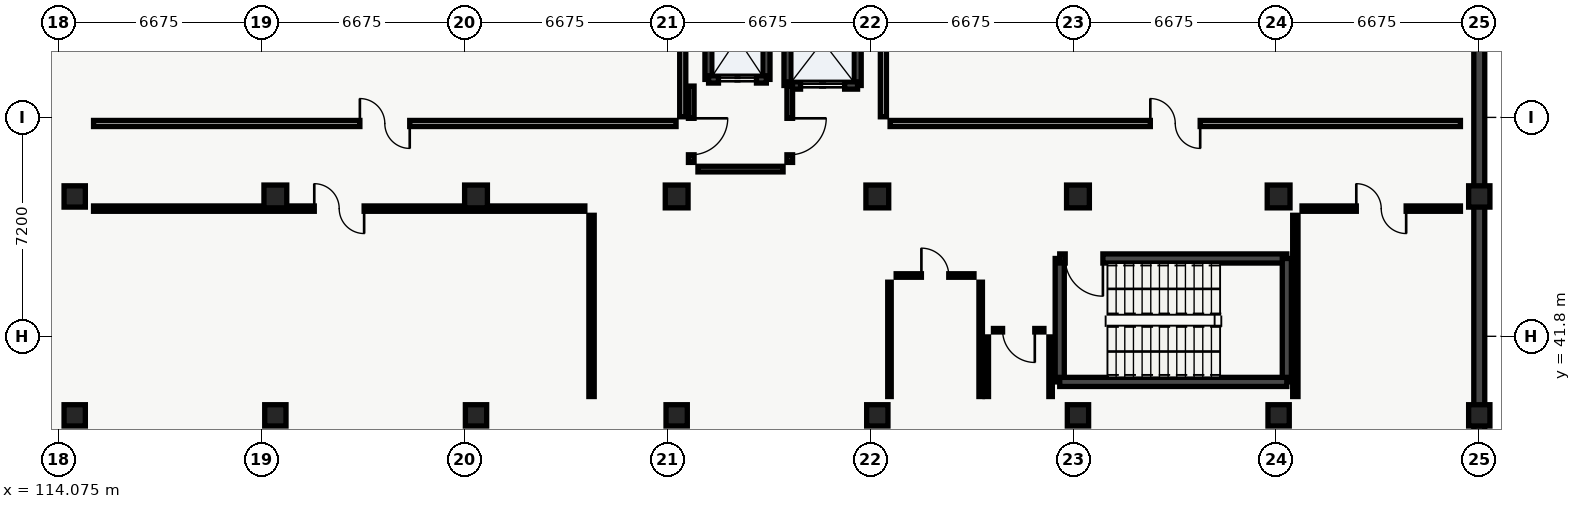
"""IFC4 building model, lengths in metres.
Left out: names, types, materials, properties, quantities, classifications, styles, units other than length and angle.
Written with IfcOpenShell. Run it as: python <this file> out.ifc"""

import sys

from ifc_helpers import new_model, si_unit, direction, frame, frame_2d, origin, origin_2d, place, context, subcontext, project, spatial, rectangle, extrude, element, fill, save


model = new_model("IFC4")
c1 = context("Model", 3, precision=1e-05, world=origin(), true_north=direction((0.0, 1.0)))
c2 = subcontext(c1, "Body", "Model", "MODEL_VIEW")
j1 = project(units=[si_unit("LENGTHUNIT", "METRE"), si_unit("PLANEANGLEUNIT", "RADIAN")], contexts=[c1])
p1 = place(None, origin())
s1 = spatial("IfcSite", under=j1, at=p1, CompositionType="ELEMENT")
p2 = place(p1, origin())
s2 = spatial("IfcBuilding", under=s1, at=p2, CompositionType="ELEMENT")
p3 = place(p2, frame((0.0, 0.0, -4.8)))
s3 = spatial("IfcBuildingStorey", under=s2, at=p3, CompositionType="ELEMENT", Elevation=-4.8)
for number, where, z_axis, x_axis in (
    (1, (114.6, 39.2, 0.0), (0.0, 0.0, 1.0), (1.0, 0.0, 0.0)),
    (2, (114.6, 46.4, 0.0), (0.0, 0.0, 1.0), (1.0, 0.0, 0.0)),
    (3, (121.2, 39.2, 0.0), (0.0, 0.0, 1.0), (1.0, 0.0, 0.0)),
):
    element("IfcColumn", number, at=place(p3, frame(where, z_axis=z_axis, x_axis=x_axis)), inside=s3, PredefinedType="COLUMN", context=c2, shape_type="SweptSolid", body=[
        extrude(rectangle(XDim=0.7, YDim=0.7, at=origin_2d()), origin(), (0.0, 0.0, 1.0), 4.59),
    ])
p4 = place(p3, frame((121.2, 46.4, 0.0), z_axis=(0.0, 0.0, 1.0), x_axis=(1.0, 0.0, 0.0)))
e4 = element("IfcColumn", 4, at=p4, inside=s3, PredefinedType="COLUMN", context=c2, shape_type="SweptSolid", body=[
    extrude(rectangle(XDim=0.75, YDim=0.75, at=origin_2d()), origin(), (0.0, 0.0, 1.0), 4.59),
])
p5 = place(p3, frame((127.8, 39.2, 0.0), z_axis=(0.0, 0.0, 1.0), x_axis=(1.0, 0.0, 0.0)))
e5 = element("IfcColumn", 5, at=p5, inside=s3, PredefinedType="COLUMN", context=c2, shape_type="SweptSolid", body=[
    extrude(rectangle(XDim=0.7, YDim=0.7, at=origin_2d()), origin(), (0.0, 0.0, 1.0), 4.59),
])
p6 = place(p3, frame((127.8, 46.4, 0.0), z_axis=(0.0, 0.0, 1.0), x_axis=(1.0, 0.0, 0.0)))
e6 = element("IfcColumn", 6, at=p6, inside=s3, PredefinedType="COLUMN", context=c2, shape_type="SweptSolid", body=[
    extrude(rectangle(XDim=0.75, YDim=0.75, at=origin_2d()), origin(), (0.0, 0.0, 1.0), 4.59),
])
p7 = place(p3, frame((134.4, 39.2, 0.0), z_axis=(0.0, 0.0, 1.0), x_axis=(1.0, 0.0, 0.0)))
e7 = element("IfcColumn", 7, at=p7, inside=s3, PredefinedType="COLUMN", context=c2, shape_type="SweptSolid", body=[
    extrude(rectangle(XDim=0.7, YDim=0.7, at=origin_2d()), origin(), (0.0, 0.0, 1.0), 4.59),
])
p8 = place(p3, frame((134.4, 46.4, 0.0), z_axis=(0.0, 0.0, 1.0), x_axis=(1.0, 0.0, 0.0)))
e8 = element("IfcColumn", 8, at=p8, inside=s3, PredefinedType="COLUMN", context=c2, shape_type="SweptSolid", body=[
    extrude(rectangle(XDim=0.75, YDim=0.75, at=origin_2d()), origin(), (0.0, 0.0, 1.0), 4.59),
])
p9 = place(p3, frame((141.0, 39.2, 0.0), z_axis=(0.0, 0.0, 1.0), x_axis=(1.0, 0.0, 0.0)))
e9 = element("IfcColumn", 9, at=p9, inside=s3, PredefinedType="COLUMN", context=c2, shape_type="SweptSolid", body=[
    extrude(rectangle(XDim=0.7, YDim=0.7, at=origin_2d()), origin(), (0.0, 0.0, 1.0), 4.59),
])
p10 = place(p3, frame((141.0, 46.4, 0.0), z_axis=(0.0, 0.0, 1.0), x_axis=(1.0, 0.0, 0.0)))
e10 = element("IfcColumn", 10, at=p10, inside=s3, PredefinedType="COLUMN", context=c2, shape_type="SweptSolid", body=[
    extrude(rectangle(XDim=0.75, YDim=0.75, at=origin_2d()), origin(), (0.0, 0.0, 1.0), 4.59),
])
p11 = place(p3, frame((147.6, 39.2, 0.0), z_axis=(0.0, 0.0, 1.0), x_axis=(1.0, 0.0, 0.0)))
e11 = element("IfcColumn", 11, at=p11, inside=s3, PredefinedType="COLUMN", context=c2, shape_type="SweptSolid", body=[
    extrude(rectangle(XDim=0.7, YDim=0.7, at=origin_2d()), origin(), (0.0, 0.0, 1.0), 4.59),
])
p12 = place(p3, frame((147.6, 46.4, 0.0), z_axis=(0.0, 0.0, 1.0), x_axis=(1.0, 0.0, 0.0)))
e12 = element("IfcColumn", 12, at=p12, inside=s3, PredefinedType="COLUMN", context=c2, shape_type="SweptSolid", body=[
    extrude(rectangle(XDim=0.75, YDim=0.75, at=origin_2d()), origin(), (0.0, 0.0, 1.0), 4.59),
])
p13 = place(p3, frame((154.2, 39.2, 0.0), z_axis=(0.0, 0.0, 1.0), x_axis=(1.0, 0.0, 0.0)))
e13 = element("IfcColumn", 13, at=p13, inside=s3, PredefinedType="COLUMN", context=c2, shape_type="SweptSolid", body=[
    extrude(rectangle(XDim=0.7, YDim=0.7, at=origin_2d()), origin(), (0.0, 0.0, 1.0), 4.59),
])
p14 = place(p3, frame((154.2, 46.4, 0.0), z_axis=(0.0, 0.0, 1.0), x_axis=(1.0, 0.0, 0.0)))
e14 = element("IfcColumn", 14, at=p14, inside=s3, PredefinedType="COLUMN", context=c2, shape_type="SweptSolid", body=[
    extrude(rectangle(XDim=0.75, YDim=0.75, at=origin_2d()), origin(), (0.0, 0.0, 1.0), 4.59),
])
for number, where, z_axis, x_axis in (
    (15, (160.8, 39.2, 0.0), (0.0, 0.0, 1.0), (1.0, 0.0, 0.0)),
    (16, (160.8, 46.4, 0.0), (0.0, 0.0, 1.0), (1.0, 0.0, 0.0)),
):
    element("IfcColumn", number, at=place(p3, frame(where, z_axis=z_axis, x_axis=x_axis)), inside=s3, PredefinedType="COLUMN", context=c2, shape_type="SweptSolid", body=[
        extrude(rectangle(XDim=0.7, YDim=0.7, at=origin_2d()), origin(), (0.0, 0.0, 1.0), 4.59),
    ])
p15 = place(p3, frame((160.8, 61.6, 0.0), z_axis=(0.0, 0.0, 1.0), x_axis=(0.0, -1.0, 0.0)))
e17 = element("IfcWall", 17, at=p15, inside=s3, PredefinedType="USERDEFINED", context=c2, shape_type="SweptSolid", body=[
    extrude(rectangle(XDim=61.4, YDim=0.36, at=frame_2d((30.7, 0.0))), origin(), (0.0, 0.0, 1.0), 4.58),
])
p16 = place(p3, frame((147.0, 40.3, 0.0), z_axis=(0.0, 0.0, 1.0), x_axis=(0.0, 1.0, 0.0)))
e18 = element("IfcWall", 18, at=p16, inside=s3, PredefinedType="SHEAR", context=c2, shape_type="SweptSolid", body=[
    extrude(rectangle(XDim=4.06, YDim=0.3, at=frame_2d((2.03, 0.0))), origin(), (0.0, 0.0, 1.0), 4.58),
])
p17 = place(p3, frame((147.0, 44.36, 0.0), z_axis=(0.0, 0.0, 1.0), x_axis=(1.0, 0.0, 0.0)))
e19 = element("IfcWall", 19, at=p17, inside=s3, PredefinedType="SHEAR", context=c2, shape_type="SweptSolid", body=[
    extrude(rectangle(XDim=7.47, YDim=0.3, at=frame_2d((3.735, 0.0))), origin(), (0.0, 0.0, 1.0), 4.58),
])
p18 = place(p17, frame((0.18, 0.0, 0.0)))
e20 = element("IfcOpeningElement", 20, at=p18, cuts=e19, PredefinedType="OPENING", context=c2, shape_type="SweptSolid", body=[
    extrude(rectangle(XDim=1.24, YDim=2.15, at=frame_2d((0.62, 1.075))), frame((0.0, 0.15, 0.0), z_axis=(0.0, -1.0, 0.0), x_axis=(1.0, 0.0, 0.0)), (0.0, 0.0, 1.0), 0.3),
])
p19 = place(p3, frame((154.47, 44.36, 0.0), z_axis=(0.0, 0.0, 1.0), x_axis=(0.0, -1.0, 0.0)))
e21 = element("IfcWall", 21, at=p19, inside=s3, PredefinedType="SHEAR", context=c2, shape_type="SweptSolid", body=[
    extrude(rectangle(XDim=4.06, YDim=0.3, at=frame_2d((2.03, 0.0))), origin(), (0.0, 0.0, 1.0), 4.58),
])
p20 = place(p3, frame((154.47, 40.3, 0.0), z_axis=(0.0, 0.0, 1.0), x_axis=(-1.0, 0.0, 0.0)))
e22 = element("IfcWall", 22, at=p20, inside=s3, PredefinedType="SHEAR", context=c2, shape_type="SweptSolid", body=[
    extrude(rectangle(XDim=7.47, YDim=0.3, at=frame_2d((3.735, 0.0))), origin(), (0.0, 0.0, 1.0), 4.58),
])
for number, where, z_axis, x_axis in (
    (23, (135.45, 50.25, 0.0), (0.0, 0.0, 1.0), (0.0, 1.0, 0.0)),
    (24, (137.35, 52.95, 0.0), (0.0, 0.0, 1.0), (0.0, -1.0, 0.0)),
):
    element("IfcWall", number, at=place(p3, frame(where, z_axis=z_axis, x_axis=x_axis)), inside=s3, PredefinedType="SHEAR", context=c2, shape_type="SweptSolid", body=[
        extrude(rectangle(XDim=2.7, YDim=0.24, at=frame_2d((1.35, 0.0))), origin(), (0.0, 0.0, 1.0), 4.58),
    ])
p21 = place(p3, frame((137.35, 50.25, 0.0), z_axis=(0.0, 0.0, 1.0), x_axis=(-1.0, 0.0, 0.0)))
e25 = element("IfcWall", 25, at=p21, inside=s3, PredefinedType="SHEAR", context=c2, shape_type="SweptSolid", body=[
    extrude(rectangle(XDim=1.9, YDim=0.24, at=frame_2d((0.95, 0.0))), origin(), (0.0, 0.0, 1.0), 4.58),
])
p22 = place(p21, frame((0.325, 0.0, 0.0)))
e26 = element("IfcOpeningElement", 26, at=p22, cuts=e25, PredefinedType="OPENING", context=c2, shape_type="SweptSolid", body=[
    extrude(rectangle(XDim=1.25, YDim=2.2, at=frame_2d((0.625, 1.1))), frame((0.0, 0.12, 0.0), z_axis=(0.0, -1.0, 0.0), x_axis=(1.0, 0.0, 0.0)), (0.0, 0.0, 1.0), 0.24),
])
for number, where, z_axis, x_axis in (
    (27, (138.05, 50.05, 0.0), (0.0, 0.0, 1.0), (0.0, 1.0, 0.0)),
    (28, (140.35, 52.95, 0.0), (0.0, 0.0, 1.0), (0.0, -1.0, 0.0)),
):
    element("IfcWall", number, at=place(p3, frame(where, z_axis=z_axis, x_axis=x_axis)), inside=s3, PredefinedType="SHEAR", context=c2, shape_type="SweptSolid", body=[
        extrude(rectangle(XDim=2.9, YDim=0.24, at=frame_2d((1.45, 0.0))), origin(), (0.0, 0.0, 1.0), 4.58),
    ])
p23 = place(p3, frame((140.35, 50.05, 0.0), z_axis=(0.0, 0.0, 1.0), x_axis=(-1.0, 0.0, 0.0)))
e29 = element("IfcWall", 29, at=p23, inside=s3, PredefinedType="SHEAR", context=c2, shape_type="SweptSolid", body=[
    extrude(rectangle(XDim=2.3, YDim=0.24, at=frame_2d((1.15, 0.0))), origin(), (0.0, 0.0, 1.0), 4.58),
])
p24 = place(p23, frame((0.425, 0.0, 0.0)))
e30 = element("IfcOpeningElement", 30, at=p24, cuts=e29, PredefinedType="OPENING", context=c2, shape_type="SweptSolid", body=[
    extrude(rectangle(XDim=1.45, YDim=2.3, at=frame_2d((0.725, 1.15))), frame((0.0, 0.12, 0.0), z_axis=(0.0, -1.0, 0.0), x_axis=(1.0, 0.0, 0.0)), (0.0, 0.0, 1.0), 0.24),
])
p25 = place(p3, frame((135.1, 47.3, 0.0), z_axis=(0.0, 0.0, 1.0), x_axis=(1.0, 0.0, 0.0)))
e31 = element("IfcWall", 31, at=p25, inside=s3, PredefinedType="SOLIDWALL", context=c2, shape_type="SweptSolid", body=[
    extrude(rectangle(XDim=2.8, YDim=0.185, at=frame_2d((1.4, 0.0))), origin(), (0.0, 0.0, 1.0), 4.25),
])
p26 = place(p3, frame((138.12, 47.52, 0.0), z_axis=(0.0, 0.0, 1.0), x_axis=(0.0, 1.0, 0.0)))
e32 = element("IfcWall", 32, at=p26, inside=s3, PredefinedType="SOLIDWALL", context=c2, shape_type="SweptSolid", body=[
    extrude(rectangle(XDim=2.51, YDim=0.185, at=frame_2d((1.255, 0.0))), origin(), (0.0, 0.0, 1.0), 4.25),
])
p27 = place(p26, frame((0.25, 0.0, 0.0)))
e33 = element("IfcOpeningElement", 33, at=p27, cuts=e32, PredefinedType="OPENING", context=c2, shape_type="SweptSolid", body=[
    extrude(rectangle(XDim=1.2, YDim=2.15, at=frame_2d((0.6, 1.075))), frame((0.0, 0.093, 0.0), z_axis=(0.0, -1.0, 0.0), x_axis=(1.0, 0.0, 0.0)), (0.0, 0.0, 1.0), 0.185),
])
p28 = place(p3, frame((134.88, 50.03, 0.0), z_axis=(0.0, 0.0, 1.0), x_axis=(0.0, -1.0, 0.0)))
e34 = element("IfcWall", 34, at=p28, inside=s3, PredefinedType="SOLIDWALL", context=c2, shape_type="SweptSolid", body=[
    extrude(rectangle(XDim=2.51, YDim=0.185, at=frame_2d((1.255, 0.0))), origin(), (0.0, 0.0, 1.0), 4.25),
])
p29 = place(p28, frame((1.06, 0.0, 0.0)))
e35 = element("IfcOpeningElement", 35, at=p29, cuts=e34, PredefinedType="OPENING", context=c2, shape_type="SweptSolid", body=[
    extrude(rectangle(XDim=1.2, YDim=2.15, at=frame_2d((0.6, 1.075))), frame((0.0, 0.093, 0.0), z_axis=(0.0, -1.0, 0.0), x_axis=(1.0, 0.0, 0.0)), (0.0, 0.0, 1.0), 0.185),
])
p30 = place(p3, frame((144.4, 39.82, 0.0), z_axis=(0.0, 0.0, 1.0), x_axis=(0.0, 1.0, 0.0)))
e36 = element("IfcWall", 36, at=p30, inside=s3, PredefinedType="PARTITIONING", context=c2, shape_type="SweptSolid", body=[
    extrude(rectangle(XDim=3.76, YDim=0.115, at=frame_2d((1.88, 0.0))), origin(), (0.0, 0.0, 1.0), 4.25),
])
p31 = place(p3, frame((144.18, 43.8, 0.0), z_axis=(0.0, 0.0, 1.0), x_axis=(-1.0, 0.0, 0.0)))
e37 = element("IfcWall", 37, at=p31, inside=s3, PredefinedType="PARTITIONING", context=c2, shape_type="SweptSolid", body=[
    extrude(rectangle(XDim=2.56, YDim=0.115, at=frame_2d((1.28, 0.0))), origin(), (0.0, 0.0, 1.0), 4.25),
])
p32 = place(p31, frame((0.83, 0.0, 0.0)))
e38 = element("IfcOpeningElement", 38, at=p32, cuts=e37, PredefinedType="OPENING", context=c2, shape_type="SweptSolid", body=[
    extrude(rectangle(XDim=0.9, YDim=2.1, at=frame_2d((0.45, 1.05))), frame((0.0, 0.058, 0.0), z_axis=(0.0, -1.0, 0.0), x_axis=(1.0, 0.0, 0.0)), (0.0, 0.0, 1.0), 0.115),
])
p33 = place(p3, frame((141.4, 43.58, 0.0), z_axis=(0.0, 0.0, 1.0), x_axis=(0.0, -1.0, 0.0)))
e39 = element("IfcWall", 39, at=p33, inside=s3, PredefinedType="PARTITIONING", context=c2, shape_type="SweptSolid", body=[
    extrude(rectangle(XDim=3.76, YDim=0.115, at=frame_2d((1.88, 0.0))), origin(), (0.0, 0.0, 1.0), 4.25),
])
p34 = place(p3, frame((146.7, 39.82, 0.0), z_axis=(0.0, 0.0, 1.0), x_axis=(0.0, 1.0, 0.0)))
e40 = element("IfcWall", 40, at=p34, inside=s3, PredefinedType="PARTITIONING", context=c2, shape_type="SweptSolid", body=[
    extrude(rectangle(XDim=1.96, YDim=0.115, at=frame_2d((0.98, 0.0))), origin(), (0.0, 0.0, 1.0), 4.25),
])
p35 = place(p3, frame((146.48, 42.0, 0.0), z_axis=(0.0, 0.0, 1.0), x_axis=(-1.0, 0.0, 0.0)))
e41 = element("IfcWall", 41, at=p35, inside=s3, PredefinedType="PARTITIONING", context=c2, shape_type="SweptSolid", body=[
    extrude(rectangle(XDim=1.66, YDim=0.115, at=frame_2d((0.83, 0.0))), origin(), (0.0, 0.0, 1.0), 4.25),
])
p36 = place(p35, frame((0.3, 0.0, 0.0)))
e42 = element("IfcOpeningElement", 42, at=p36, cuts=e41, PredefinedType="OPENING", context=c2, shape_type="SweptSolid", body=[
    extrude(rectangle(XDim=1.06, YDim=2.12, at=frame_2d((0.53, 1.06))), frame((0.0, 0.058, 0.0), z_axis=(0.0, -1.0, 0.0), x_axis=(1.0, 0.0, 0.0)), (0.0, 0.0, 1.0), 0.115),
])
p37 = place(p3, frame((144.6, 41.78, 0.0), z_axis=(0.0, 0.0, 1.0), x_axis=(0.0, -1.0, 0.0)))
e43 = element("IfcWall", 43, at=p37, inside=s3, PredefinedType="PARTITIONING", context=c2, shape_type="SweptSolid", body=[
    extrude(rectangle(XDim=1.96, YDim=0.115, at=frame_2d((0.98, 0.0))), origin(), (0.0, 0.0, 1.0), 4.25),
])
p38 = place(p3, frame((115.22, 48.8, 0.0), z_axis=(0.0, 0.0, 1.0), x_axis=(1.0, 0.0, 0.0)))
e44 = element("IfcWall", 44, at=p38, inside=s3, PredefinedType="SOLIDWALL", context=c2, shape_type="SweptSolid", body=[
    extrude(rectangle(XDim=19.16, YDim=0.2, at=frame_2d((9.58, 0.0))), origin(), (0.0, 0.0, 1.0), 4.125),
])
p39 = place(p38, frame((8.76, 0.0, 0.0)))
e45 = element("IfcOpeningElement", 45, at=p39, cuts=e44, PredefinedType="OPENING", context=c2, shape_type="SweptSolid", body=[
    extrude(rectangle(XDim=1.64, YDim=2.2, at=frame_2d((0.82, 1.1))), frame((0.0, 0.1, 0.0), z_axis=(0.0, -1.0, 0.0), x_axis=(1.0, 0.0, 0.0)), (0.0, 0.0, 1.0), 0.2),
])
p40 = place(p3, frame((134.6, 49.02, 0.0), z_axis=(0.0, 0.0, 1.0), x_axis=(0.0, 1.0, 0.0)))
e46 = element("IfcWall", 46, at=p40, inside=s3, PredefinedType="SOLIDWALL", context=c2, shape_type="SweptSolid", body=[
    extrude(rectangle(XDim=11.16, YDim=0.2, at=frame_2d((5.58, 0.0))), origin(), (0.0, 0.0, 1.0), 3.925),
])
p41 = place(p3, frame((141.42, 48.8, 0.0), z_axis=(0.0, 0.0, 1.0), x_axis=(1.0, 0.0, 0.0)))
e47 = element("IfcWall", 47, at=p41, inside=s3, PredefinedType="SOLIDWALL", context=c2, shape_type="SweptSolid", body=[
    extrude(rectangle(XDim=18.76, YDim=0.2, at=frame_2d((9.38, 0.0))), origin(), (0.0, 0.0, 1.0), 4.125),
])
p42 = place(p41, frame((8.56, 0.0, 0.0)))
e48 = element("IfcOpeningElement", 48, at=p42, cuts=e47, PredefinedType="OPENING", context=c2, shape_type="SweptSolid", body=[
    extrude(rectangle(XDim=1.64, YDim=2.2, at=frame_2d((0.82, 1.1))), frame((0.0, 0.1, 0.0), z_axis=(0.0, -1.0, 0.0), x_axis=(1.0, 0.0, 0.0)), (0.0, 0.0, 1.0), 0.2),
])
p43 = place(p3, frame((141.2, 60.18, 0.0), z_axis=(0.0, 0.0, 1.0), x_axis=(0.0, -1.0, 0.0)))
e49 = element("IfcWall", 49, at=p43, inside=s3, PredefinedType="SOLIDWALL", context=c2, shape_type="SweptSolid", body=[
    extrude(rectangle(XDim=11.16, YDim=0.2, at=frame_2d((5.58, 0.0))), origin(), (0.0, 0.0, 1.0), 3.925),
])
p44 = place(p3, frame((131.6, 39.82, 0.0), z_axis=(0.0, 0.0, 1.0), x_axis=(0.0, 1.0, 0.0)))
e50 = element("IfcWall", 50, at=p44, inside=s3, PredefinedType="SOLIDWALL", context=c2, shape_type="SweptSolid", body=[
    extrude(rectangle(XDim=5.96, YDim=0.175, at=frame_2d((2.98, 0.0))), origin(), (0.0, 0.0, 1.0), 4.25),
])
p45 = place(p3, frame((131.38, 46.0, 0.0), z_axis=(0.0, 0.0, 1.0), x_axis=(-1.0, 0.0, 0.0)))
e51 = element("IfcWall", 51, at=p45, inside=s3, PredefinedType="SOLIDWALL", context=c2, shape_type="SweptSolid", body=[
    extrude(rectangle(XDim=16.16, YDim=0.175, at=frame_2d((8.08, 0.0))), origin(), (0.0, 0.0, 1.0), 4.25),
])
p46 = place(p45, frame((7.26, 0.0, 0.0)))
e52 = element("IfcOpeningElement", 52, at=p46, cuts=e51, PredefinedType="OPENING", context=c2, shape_type="SweptSolid", body=[
    extrude(rectangle(XDim=1.64, YDim=2.2, at=frame_2d((0.82, 1.1))), frame((0.0, 0.087, 0.0), z_axis=(0.0, -1.0, 0.0), x_axis=(1.0, 0.0, 0.0)), (0.0, 0.0, 1.0), 0.175),
])
p47 = place(p3, frame((160.18, 46.0, 0.0), z_axis=(0.0, 0.0, 1.0), x_axis=(-1.0, 0.0, 0.0)))
e53 = element("IfcWall", 53, at=p47, inside=s3, PredefinedType="SOLIDWALL", context=c2, shape_type="SweptSolid", body=[
    extrude(rectangle(XDim=5.21, YDim=0.175, at=frame_2d((2.605, 0.0))), origin(), (0.0, 0.0, 1.0), 4.25),
])
p48 = place(p47, frame((1.785, 0.0, 0.0)))
e54 = element("IfcOpeningElement", 54, at=p48, cuts=e53, PredefinedType="OPENING", context=c2, shape_type="SweptSolid", body=[
    extrude(rectangle(XDim=1.64, YDim=2.2, at=frame_2d((0.82, 1.1))), frame((0.0, 0.087, 0.0), z_axis=(0.0, -1.0, 0.0), x_axis=(1.0, 0.0, 0.0)), (0.0, 0.0, 1.0), 0.175),
])
p49 = place(p3, frame((154.75, 45.78, 0.0), z_axis=(0.0, 0.0, 1.0), x_axis=(0.0, -1.0, 0.0)))
e55 = element("IfcWall", 55, at=p49, inside=s3, PredefinedType="SOLIDWALL", context=c2, shape_type="SweptSolid", body=[
    extrude(rectangle(XDim=5.96, YDim=0.175, at=frame_2d((2.98, 0.0))), origin(), (0.0, 0.0, 1.0), 4.25),
])
p50 = place(p18, origin())
e56 = element("IfcDoor", 56, at=p50, inside=s3, OperationType="SINGLE_SWING_RIGHT", PredefinedType="DOOR", context=c2, shape_type="SweptSolid", body=[
    extrude(rectangle(XDim=1.24, YDim=2.15, at=frame_2d((0.62, 1.075))), frame((0.0, 0.025, 0.0), z_axis=(0.0, -1.0, 0.0), x_axis=(1.0, 0.0, 0.0)), (0.0, 0.0, 1.0), 0.05),
])
fill(e20, e56)
p51 = place(p22, origin())
e57 = element("IfcDoor", 57, at=p51, inside=s3, OperationType="SLIDING_TO_RIGHT", PredefinedType="DOOR", context=c2, shape_type="SweptSolid", body=[
    extrude(rectangle(XDim=1.25, YDim=2.2, at=frame_2d((0.625, 1.1))), frame((0.0, 0.025, 0.0), z_axis=(0.0, -1.0, 0.0), x_axis=(1.0, 0.0, 0.0)), (0.0, 0.0, 1.0), 0.05),
])
fill(e26, e57)
p52 = place(p24, origin())
e58 = element("IfcDoor", 58, at=p52, inside=s3, OperationType="DOUBLE_DOOR_SLIDING", PredefinedType="DOOR", context=c2, shape_type="SweptSolid", body=[
    extrude(rectangle(XDim=1.45, YDim=2.3, at=frame_2d((0.725, 1.15))), frame((0.0, 0.025, 0.0), z_axis=(0.0, -1.0, 0.0), x_axis=(1.0, 0.0, 0.0)), (0.0, 0.0, 1.0), 0.05),
])
fill(e30, e58)
p53 = place(p27, origin())
e59 = element("IfcDoor", 59, at=p53, inside=s3, OperationType="SINGLE_SWING_RIGHT", PredefinedType="DOOR", context=c2, shape_type="SweptSolid", body=[
    extrude(rectangle(XDim=1.2, YDim=2.15, at=frame_2d((0.6, 1.075))), frame((0.0, 0.025, 0.0), z_axis=(0.0, -1.0, 0.0), x_axis=(1.0, 0.0, 0.0)), (0.0, 0.0, 1.0), 0.05),
])
fill(e33, e59)
p54 = place(p29, origin())
e60 = element("IfcDoor", 60, at=p54, inside=s3, OperationType="SINGLE_SWING_LEFT", PredefinedType="DOOR", context=c2, shape_type="SweptSolid", body=[
    extrude(rectangle(XDim=1.2, YDim=2.15, at=frame_2d((0.6, 1.075))), frame((0.0, 0.025, 0.0), z_axis=(0.0, -1.0, 0.0), x_axis=(1.0, 0.0, 0.0)), (0.0, 0.0, 1.0), 0.05),
])
fill(e35, e60)
p55 = place(p32, origin())
e61 = element("IfcDoor", 61, at=p55, inside=s3, OperationType="SINGLE_SWING_RIGHT", PredefinedType="DOOR", context=c2, shape_type="SweptSolid", body=[
    extrude(rectangle(XDim=0.9, YDim=2.1, at=frame_2d((0.45, 1.05))), frame((0.0, 0.025, 0.0), z_axis=(0.0, -1.0, 0.0), x_axis=(1.0, 0.0, 0.0)), (0.0, 0.0, 1.0), 0.05),
])
fill(e38, e61)
p56 = place(p36, origin())
e62 = element("IfcDoor", 62, at=p56, inside=s3, OperationType="SINGLE_SWING_LEFT", PredefinedType="DOOR", context=c2, shape_type="SweptSolid", body=[
    extrude(rectangle(XDim=1.06, YDim=2.12, at=frame_2d((0.53, 1.06))), frame((0.0, 0.025, 0.0), z_axis=(0.0, -1.0, 0.0), x_axis=(1.0, 0.0, 0.0)), (0.0, 0.0, 1.0), 0.05),
])
fill(e42, e62)
p57 = place(p39, origin())
e63 = element("IfcDoor", 63, at=p57, inside=s3, OperationType="DOUBLE_DOOR_SINGLE_SWING", PredefinedType="DOOR", context=c2, shape_type="SweptSolid", body=[
    extrude(rectangle(XDim=1.64, YDim=2.2, at=frame_2d((0.82, 1.1))), frame((0.0, 0.025, 0.0), z_axis=(0.0, -1.0, 0.0), x_axis=(1.0, 0.0, 0.0)), (0.0, 0.0, 1.0), 0.05),
])
fill(e45, e63)
p58 = place(p42, origin())
e64 = element("IfcDoor", 64, at=p58, inside=s3, OperationType="DOUBLE_DOOR_SINGLE_SWING", PredefinedType="DOOR", context=c2, shape_type="SweptSolid", body=[
    extrude(rectangle(XDim=1.64, YDim=2.2, at=frame_2d((0.82, 1.1))), frame((0.0, 0.025, 0.0), z_axis=(0.0, -1.0, 0.0), x_axis=(1.0, 0.0, 0.0)), (0.0, 0.0, 1.0), 0.05),
])
fill(e48, e64)
p59 = place(p46, origin())
e65 = element("IfcDoor", 65, at=p59, inside=s3, OperationType="DOUBLE_DOOR_SINGLE_SWING", PredefinedType="DOOR", context=c2, shape_type="SweptSolid", body=[
    extrude(rectangle(XDim=1.64, YDim=2.2, at=frame_2d((0.82, 1.1))), frame((0.0, 0.025, 0.0), z_axis=(0.0, -1.0, 0.0), x_axis=(1.0, 0.0, 0.0)), (0.0, 0.0, 1.0), 0.05),
])
fill(e52, e65)
p60 = place(p48, origin())
e66 = element("IfcDoor", 66, at=p60, inside=s3, OperationType="DOUBLE_DOOR_SINGLE_SWING", PredefinedType="DOOR", context=c2, shape_type="SweptSolid", body=[
    extrude(rectangle(XDim=1.64, YDim=2.2, at=frame_2d((0.82, 1.1))), frame((0.0, 0.025, 0.0), z_axis=(0.0, -1.0, 0.0), x_axis=(1.0, 0.0, 0.0)), (0.0, 0.0, 1.0), 0.05),
])
fill(e54, e66)
save(model, sys.argv[1])
